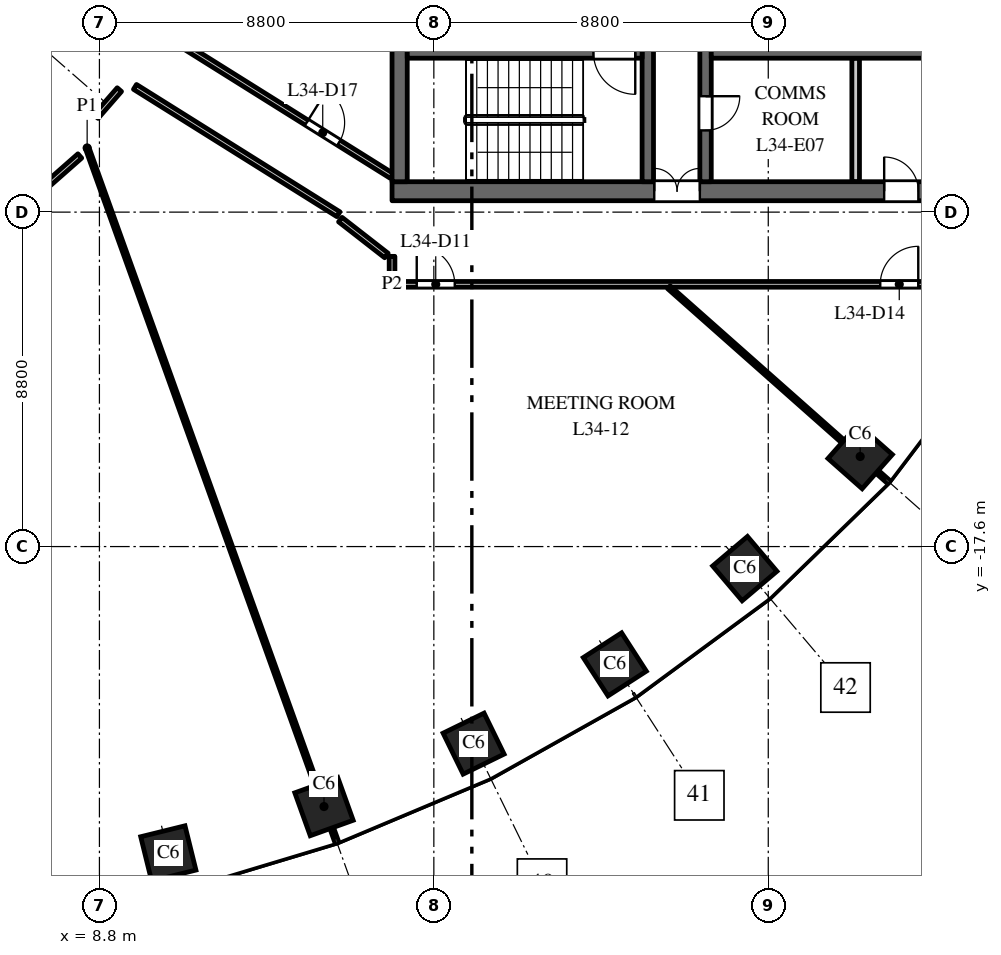
"""IFC4 building model, lengths in metres.
Left out: names, types, materials, properties, quantities, classifications, styles, units other than length and angle.
Written with IfcOpenShell. Run it as: python <this file> out.ifc"""

import sys

from ifc_helpers import new_model, si_unit, direction, frame, frame_2d, origin, origin_2d, place, context, subcontext, project, spatial, rectangle, extrude, element, fill, save


model = new_model("IFC4")
c1 = context("Model", 3, precision=1e-05, world=origin(), true_north=direction((0.0, 1.0)))
c2 = subcontext(c1, "Body", "Model", "MODEL_VIEW")
j1 = project(units=[si_unit("LENGTHUNIT", "METRE"), si_unit("PLANEANGLEUNIT", "RADIAN")], contexts=[c1])
p1 = place(None, origin())
s1 = spatial("IfcSite", under=j1, at=p1, CompositionType="ELEMENT")
p2 = place(p1, origin())
s2 = spatial("IfcBuilding", under=s1, at=p2, CompositionType="ELEMENT")
p3 = place(p2, frame((0.0, 0.0, 150.0)))
s3 = spatial("IfcBuildingStorey", under=s2, at=p3, CompositionType="ELEMENT", Elevation=150.0)
for number, where, z_axis, x_axis in (
    (1, (10.613, -25.674, 0.0), (0.0, 0.0, 1.0), (0.971, 0.24, 0.0)),
    (2, (14.709, -24.441, 0.0), (0.0, 0.0, 1.0), (0.941, 0.338, 0.0)),
    (3, (18.646, -22.785, 0.0), (0.0, 0.0, 1.0), (0.898, 0.439, 0.0)),
    (4, (22.362, -20.7, 0.0), (0.0, 0.0, 1.0), (0.84, 0.542, 0.0)),
    (5, (25.783, -18.18, 0.0), (0.0, 0.0, 1.0), (0.763, 0.646, 0.0)),
    (6, (28.819, -15.23, 0.0), (0.0, 0.0, 1.0), (0.663, 0.749, 0.0)),
):
    element("IfcColumn", number, at=place(p3, frame(where, z_axis=z_axis, x_axis=x_axis)), inside=s3, PredefinedType="COLUMN", context=c2, shape_type="SweptSolid", body=[
        extrude(rectangle(XDim=1.2, YDim=1.2, at=origin_2d()), origin(), (0.0, 0.0, 1.0), 4.0),
    ])
p4 = place(p3, frame((16.5, -8.25, 0.0), z_axis=(0.0, 0.0, 1.0), x_axis=(1.0, 0.0, 0.0)))
e7 = element("IfcWall", 7, at=p4, inside=s3, PredefinedType="SHEAR", context=c2, shape_type="SweptSolid", body=[
    extrude(rectangle(XDim=15.0, YDim=0.5, at=frame_2d((7.5, 0.0))), origin(), (0.0, 0.0, 1.0), 3.7),
])
p5 = place(p4, frame((6.9, 0.0, 0.0)))
e8 = element("IfcOpeningElement", 8, at=p5, cuts=e7, PredefinedType="OPENING", context=c2, shape_type="SweptSolid", body=[
    extrude(rectangle(XDim=1.2, YDim=2.1, at=frame_2d((0.6, 1.05))), frame((0.0, 0.26, 0.0), z_axis=(0.0, -1.0, 0.0), x_axis=(1.0, 0.0, 0.0)), (0.0, 0.0, 1.0), 0.52),
])
p6 = place(p4, frame((12.95, 0.0, 0.0)))
e9 = element("IfcOpeningElement", 9, at=p6, cuts=e7, PredefinedType="OPENING", context=c2, shape_type="SweptSolid", body=[
    extrude(rectangle(XDim=0.9, YDim=2.1, at=frame_2d((0.45, 1.05))), frame((0.0, 0.26, 0.0), z_axis=(0.0, -1.0, 0.0), x_axis=(1.0, 0.0, 0.0)), (0.0, 0.0, 1.0), 0.52),
])
p7 = place(p3, frame((24.75, -8.0, 0.0), z_axis=(0.0, 0.0, 1.0), x_axis=(0.0, 1.0, 0.0)))
e10 = element("IfcWall", 10, at=p7, inside=s3, PredefinedType="SHEAR", context=c2, shape_type="SweptSolid", body=[
    extrude(rectangle(XDim=16.0, YDim=0.3, at=frame_2d((8.0, 0.0))), origin(), (0.0, 0.0, 1.0), 3.7),
])
p8 = place(p7, frame((4.425, 0.0, 0.0)))
e11 = element("IfcOpeningElement", 11, at=p8, cuts=e10, PredefinedType="OPENING", context=c2, shape_type="SweptSolid", body=[
    extrude(rectangle(XDim=1.1, YDim=2.1, at=frame_2d((0.55, 1.05))), frame((0.0, 0.16, 0.0), z_axis=(0.0, -1.0, 0.0), x_axis=(1.0, 0.0, 0.0)), (0.0, 0.0, 1.0), 0.32),
])
p9 = place(p7, frame((7.45, 0.0, 0.0)))
e12 = element("IfcOpeningElement", 12, at=p9, cuts=e10, PredefinedType="OPENING", context=c2, shape_type="SweptSolid", body=[
    extrude(rectangle(XDim=1.1, YDim=2.1, at=frame_2d((0.55, 1.05))), frame((0.0, 0.16, 0.0), z_axis=(0.0, -1.0, 0.0), x_axis=(1.0, 0.0, 0.0)), (0.0, 0.0, 1.0), 0.32),
])
p10 = place(p7, frame((10.475, 0.0, 0.0)))
e13 = element("IfcOpeningElement", 13, at=p10, cuts=e10, PredefinedType="OPENING", context=c2, shape_type="SweptSolid", body=[
    extrude(rectangle(XDim=1.1, YDim=2.1, at=frame_2d((0.55, 1.05))), frame((0.0, 0.16, 0.0), z_axis=(0.0, -1.0, 0.0), x_axis=(1.0, 0.0, 0.0)), (0.0, 0.0, 1.0), 0.32),
])
p11 = place(p7, frame((13.125, 0.0, 0.0)))
e14 = element("IfcOpeningElement", 14, at=p11, cuts=e10, PredefinedType="OPENING", context=c2, shape_type="SweptSolid", body=[
    extrude(rectangle(XDim=0.9, YDim=2.1, at=frame_2d((0.45, 1.05))), frame((0.0, 0.16, 0.0), z_axis=(0.0, -1.0, 0.0), x_axis=(1.0, 0.0, 0.0)), (0.0, 0.0, 1.0), 0.32),
])
p12 = place(p7, frame((14.75, 0.0, 0.0)))
e15 = element("IfcOpeningElement", 15, at=p12, cuts=e10, PredefinedType="OPENING", context=c2, shape_type="SweptSolid", body=[
    extrude(rectangle(XDim=0.9, YDim=2.1, at=frame_2d((0.45, 1.05))), frame((0.0, 0.16, 0.0), z_axis=(0.0, -1.0, 0.0), x_axis=(1.0, 0.0, 0.0)), (0.0, 0.0, 1.0), 0.32),
])
p13 = place(p7, frame((1.35, 0.0, 0.0)))
e16 = element("IfcOpeningElement", 16, at=p13, cuts=e10, PredefinedType="OPENING", context=c2, shape_type="SweptSolid", body=[
    extrude(rectangle(XDim=0.9, YDim=2.1, at=frame_2d((0.45, 1.05))), frame((0.0, 0.16, 0.0), z_axis=(0.0, -1.0, 0.0), x_axis=(1.0, 0.0, 0.0)), (0.0, 0.0, 1.0), 0.32),
])
p14 = place(p3, frame((16.7, -8.0, 0.0), z_axis=(0.0, 0.0, 1.0), x_axis=(0.0, 1.0, 0.0)))
e17 = element("IfcWall", 17, at=p14, inside=s3, PredefinedType="SHEAR", context=c2, shape_type="SweptSolid", body=[
    extrude(rectangle(XDim=16.0, YDim=0.4, at=frame_2d((8.0, 0.0))), origin(), (0.0, 0.0, 1.0), 3.7),
])
p15 = place(p3, frame((28.7, -8.0, 0.0), z_axis=(0.0, 0.0, 1.0), x_axis=(0.0, 1.0, 0.0)))
e18 = element("IfcWall", 18, at=p15, inside=s3, PredefinedType="PARTITIONING", context=c2, shape_type="SweptSolid", body=[
    extrude(rectangle(XDim=3.25, YDim=0.2, at=frame_2d((1.625, 0.0))), origin(), (0.0, 0.0, 1.0), 3.7),
])
p16 = place(p3, frame((24.9, -4.6, 0.0), z_axis=(0.0, 0.0, 1.0), x_axis=(1.0, 0.0, 0.0)))
e19 = element("IfcWall", 19, at=p16, inside=s3, PredefinedType="SHEAR", context=c2, shape_type="SweptSolid", body=[
    extrude(rectangle(XDim=6.1, YDim=0.3, at=frame_2d((3.05, 0.0))), origin(), (0.0, 0.0, 1.0), 3.7),
])
p17 = place(p3, frame((23.23, -8.0, 0.0), z_axis=(0.0, 0.0, 1.0), x_axis=(0.0, 1.0, 0.0)))
e20 = element("IfcWall", 20, at=p17, inside=s3, PredefinedType="SHEAR", context=c2, shape_type="SweptSolid", body=[
    extrude(rectangle(XDim=7.875, YDim=0.3, at=frame_2d((3.938, 0.0))), origin(), (0.0, 0.0, 1.0), 3.7),
])
p18 = place(p17, frame((5.15, 0.0, 0.0)))
e21 = element("IfcOpeningElement", 21, at=p18, cuts=e20, PredefinedType="OPENING", context=c2, shape_type="SweptSolid", body=[
    extrude(rectangle(XDim=1.1, YDim=2.1, at=frame_2d((0.55, 1.05))), frame((0.0, 0.16, 0.0), z_axis=(0.0, -1.0, 0.0), x_axis=(1.0, 0.0, 0.0)), (0.0, 0.0, 1.0), 0.32),
])
p19 = place(p3, frame((16.9, -4.6, 0.0), z_axis=(0.0, 0.0, 1.0), x_axis=(1.0, 0.0, 0.0)))
e22 = element("IfcWall", 22, at=p19, inside=s3, PredefinedType="SHEAR", context=c2, shape_type="SweptSolid", body=[
    extrude(rectangle(XDim=6.18, YDim=0.3, at=frame_2d((3.09, 0.0))), origin(), (0.0, 0.0, 1.0), 3.7),
])
p20 = place(p19, frame((4.9, 0.0, 0.0)))
e23 = element("IfcOpeningElement", 23, at=p20, cuts=e22, PredefinedType="OPENING", context=c2, shape_type="SweptSolid", body=[
    extrude(rectangle(XDim=1.1, YDim=2.1, at=frame_2d((0.55, 1.05))), frame((0.0, 0.16, 0.0), z_axis=(0.0, -1.0, 0.0), x_axis=(1.0, 0.0, 0.0)), (0.0, 0.0, 1.0), 0.32),
])
p21 = place(p3, frame((7.458, -8.049, 0.0), z_axis=(0.0, 0.0, 1.0), x_axis=(0.75060787095, 0.660747927782, 0.0)))
e24 = element("IfcWall", 24, at=p21, inside=s3, PredefinedType="PARTITIONING", context=c2, shape_type="SweptSolid", body=[
    extrude(rectangle(XDim=1.1, YDim=0.15, at=frame_2d((0.55, 0.0))), origin(), (0.0, 0.0, 1.0), 3.7),
])
p22 = place(p3, frame((8.477, -7.111, 0.0), z_axis=(0.0, 0.0, 1.0), x_axis=(0.338406456341, -0.941000037357, 0.0)))
e25 = element("IfcWall", 25, at=p22, inside=s3, PredefinedType="PARTITIONING", context=c2, shape_type="SweptSolid", body=[
    extrude(rectangle(XDim=19.418, YDim=0.1, at=frame_2d((9.709, 0.0))), origin(), (0.0, 0.0, 1.0), 2.85),
])
p23 = place(p3, frame((8.709, -6.285, 0.0), z_axis=(0.0, 0.0, 1.0), x_axis=(0.656365478363, 0.754443078578, 0.0)))
e26 = element("IfcWall", 26, at=p23, inside=s3, PredefinedType="PARTITIONING", context=c2, shape_type="SweptSolid", body=[
    extrude(rectangle(XDim=0.938, YDim=0.15, at=frame_2d((0.469, 0.0))), origin(), (0.0, 0.0, 1.0), 3.7),
])
p24 = place(p3, frame((9.736, -5.505, 0.0), z_axis=(0.0, 0.0, 1.0), x_axis=(0.847611500167, -0.53061732424, 0.0)))
e27 = element("IfcWall", 27, at=p24, inside=s3, PredefinedType="PARTITIONING", context=c2, shape_type="SweptSolid", body=[
    extrude(rectangle(XDim=6.315, YDim=0.15, at=frame_2d((3.158, 0.0))), origin(), (0.0, 0.0, 1.0), 3.7),
])
p25 = place(p3, frame((10.752, -4.254, 0.0), z_axis=(0.0, 0.0, 1.0), x_axis=(0.847690706888, -0.530490777917, 0.0)))
e28 = element("IfcWall", 28, at=p25, inside=s3, PredefinedType="PARTITIONING", context=c2, shape_type="SweptSolid", body=[
    extrude(rectangle(XDim=6.781, YDim=0.15, at=frame_2d((3.39, 0.0))), origin(), (0.0, 0.0, 1.0), 3.7),
])
p26 = place(p25, frame((4.129, 0.0, 0.0)))
e29 = element("IfcOpeningElement", 29, at=p26, cuts=e28, PredefinedType="OPENING", context=c2, shape_type="SweptSolid", body=[
    extrude(rectangle(XDim=1.0, YDim=2.1, at=frame_2d((0.5, 1.05))), frame((0.0, 0.085, 0.0), z_axis=(0.0, -1.0, 0.0), x_axis=(1.0, 0.0, 0.0)), (0.0, 0.0, 1.0), 0.17),
])
p27 = place(p3, frame((16.5, -10.7, 0.0), z_axis=(0.0, 0.0, 1.0), x_axis=(0.0, 1.0, 0.0)))
e30 = element("IfcWall", 30, at=p27, inside=s3, PredefinedType="PARTITIONING", context=c2, shape_type="SweptSolid", body=[
    extrude(rectangle(XDim=0.736, YDim=0.15, at=frame_2d((0.368, 0.0))), origin(), (0.0, 0.0, 1.0), 3.7),
])
p28 = place(p3, frame((16.5, -10.7, 0.0), z_axis=(0.0, 0.0, 1.0), x_axis=(1.0, 0.0, 0.0)))
e31 = element("IfcWall", 31, at=p28, inside=s3, PredefinedType="PARTITIONING", context=c2, shape_type="SweptSolid", body=[
    extrude(rectangle(XDim=15.0, YDim=0.15, at=frame_2d((7.5, 0.0))), origin(), (0.0, 0.0, 1.0), 2.75),
])
p29 = place(p28, frame((0.65, 0.0, 0.0)))
e32 = element("IfcOpeningElement", 32, at=p29, cuts=e31, PredefinedType="OPENING", context=c2, shape_type="SweptSolid", body=[
    extrude(rectangle(XDim=1.0, YDim=2.1, at=frame_2d((0.5, 1.05))), frame((0.0, 0.085, 0.0), z_axis=(0.0, -1.0, 0.0), x_axis=(1.0, 0.0, 0.0)), (0.0, 0.0, 1.0), 0.17),
])
p30 = place(p28, frame((12.847, 0.0, 0.0)))
e33 = element("IfcOpeningElement", 33, at=p30, cuts=e31, PredefinedType="OPENING", context=c2, shape_type="SweptSolid", body=[
    extrude(rectangle(XDim=1.0, YDim=2.1, at=frame_2d((0.5, 1.05))), frame((0.0, 0.085, 0.0), z_axis=(0.0, -1.0, 0.0), x_axis=(1.0, 0.0, 0.0)), (0.0, 0.0, 1.0), 0.17),
])
p31 = place(p3, frame((23.785, -10.778, 0.0), z_axis=(0.0, 0.0, 1.0), x_axis=(0.748616873252, -0.663002848472, 0.0)))
e34 = element("IfcWall", 34, at=p31, inside=s3, PredefinedType="PARTITIONING", context=c2, shape_type="SweptSolid", body=[
    extrude(rectangle(XDim=7.722, YDim=0.1, at=frame_2d((3.861, 0.0))), origin(), (0.0, 0.0, 1.0), 3.7),
])
p32 = place(p3, frame((16.352, -9.942, 0.0), z_axis=(0.0, 0.0, 1.0), x_axis=(-0.788950226826, 0.614457109643, 0.0)))
e35 = element("IfcWall", 35, at=p32, inside=s3, PredefinedType="PARTITIONING", context=c2, shape_type="SweptSolid", body=[
    extrude(rectangle(XDim=1.538, YDim=0.15, at=frame_2d((0.769, 0.0))), origin(), (0.0, 0.0, 1.0), 3.7),
])
p33 = place(p20, origin())
e36 = element("IfcDoor", 36, at=p33, inside=s3, OperationType="SINGLE_SWING_RIGHT", PredefinedType="DOOR", context=c2, shape_type="SweptSolid", body=[
    extrude(rectangle(XDim=1.1, YDim=2.1, at=frame_2d((0.55, 1.05))), frame((0.0, 0.025, 0.0), z_axis=(0.0, -1.0, 0.0), x_axis=(1.0, 0.0, 0.0)), (0.0, 0.0, 1.0), 0.05),
])
fill(e23, e36)
p34 = place(p5, origin())
e37 = element("IfcDoor", 37, at=p34, inside=s3, OperationType="DOUBLE_DOOR_DOUBLE_SWING", PredefinedType="DOOR", context=c2, shape_type="SweptSolid", body=[
    extrude(rectangle(XDim=1.2, YDim=2.1, at=frame_2d((0.6, 1.05))), frame((0.0, 0.025, 0.0), z_axis=(0.0, -1.0, 0.0), x_axis=(1.0, 0.0, 0.0)), (0.0, 0.0, 1.0), 0.05),
])
fill(e8, e37)
p35 = place(p13, origin())
e38 = element("IfcDoor", 38, at=p35, inside=s3, OperationType="SINGLE_SWING_RIGHT", PredefinedType="DOOR", context=c2, shape_type="SweptSolid", body=[
    extrude(rectangle(XDim=0.9, YDim=2.1, at=frame_2d((0.45, 1.05))), frame((0.0, 0.025, 0.0), z_axis=(0.0, -1.0, 0.0), x_axis=(1.0, 0.0, 0.0)), (0.0, 0.0, 1.0), 0.05),
])
fill(e16, e38)
p36 = place(p6, origin())
e39 = element("IfcDoor", 39, at=p36, inside=s3, OperationType="SINGLE_SWING_RIGHT", PredefinedType="DOOR", context=c2, shape_type="SweptSolid", body=[
    extrude(rectangle(XDim=0.9, YDim=2.1, at=frame_2d((0.45, 1.05))), frame((0.0, 0.025, 0.0), z_axis=(0.0, -1.0, 0.0), x_axis=(1.0, 0.0, 0.0)), (0.0, 0.0, 1.0), 0.05),
])
fill(e9, e39)
p37 = place(p29, origin())
e40 = element("IfcDoor", 40, at=p37, inside=s3, OperationType="SINGLE_SWING_LEFT", PredefinedType="DOOR", context=c2, shape_type="SweptSolid", body=[
    extrude(rectangle(XDim=1.0, YDim=2.1, at=frame_2d((0.5, 1.05))), frame((0.0, 0.025, 0.0), z_axis=(0.0, -1.0, 0.0), x_axis=(1.0, 0.0, 0.0)), (0.0, 0.0, 1.0), 0.05),
])
fill(e32, e40)
p38 = place(p30, origin())
e41 = element("IfcDoor", 41, at=p38, inside=s3, OperationType="SINGLE_SWING_RIGHT", PredefinedType="DOOR", context=c2, shape_type="SweptSolid", body=[
    extrude(rectangle(XDim=1.0, YDim=2.1, at=frame_2d((0.5, 1.05))), frame((0.0, 0.025, 0.0), z_axis=(0.0, -1.0, 0.0), x_axis=(1.0, 0.0, 0.0)), (0.0, 0.0, 1.0), 0.05),
])
fill(e33, e41)
p39 = place(p26, origin())
e42 = element("IfcDoor", 42, at=p39, inside=s3, OperationType="SINGLE_SWING_LEFT", PredefinedType="DOOR", context=c2, shape_type="SweptSolid", body=[
    extrude(rectangle(XDim=1.0, YDim=2.1, at=frame_2d((0.5, 1.05))), frame((0.0, 0.025, 0.0), z_axis=(0.0, -1.0, 0.0), x_axis=(1.0, 0.0, 0.0)), (0.0, 0.0, 1.0), 0.05),
])
fill(e29, e42)
save(model, sys.argv[1])
